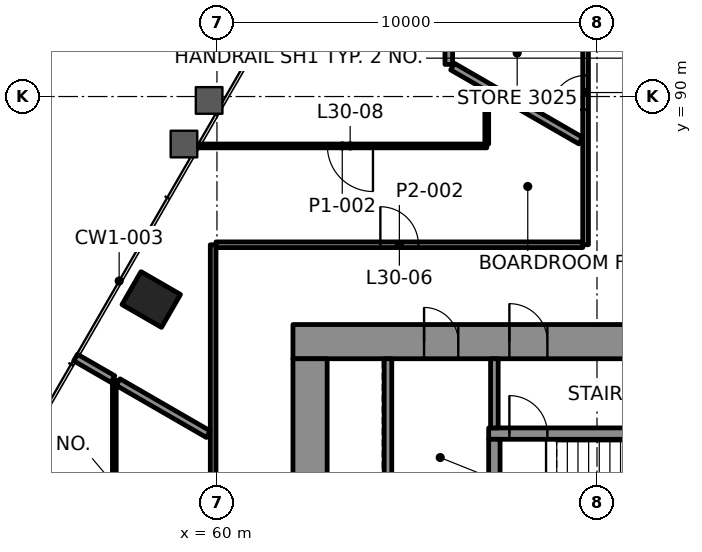
"""IFC4 building model, lengths in metres.
Left out: names, types, materials, properties, quantities, classifications, styles, units other than length and angle.
Written with IfcOpenShell. Run it as: python <this file> out.ifc"""

import sys

from ifc_helpers import new_model, si_unit, direction, frame, frame_2d, origin, origin_2d, place, context, subcontext, project, spatial, rectangle, extrude, element, fill, save


model = new_model("IFC4")
c1 = context("Model", 3, precision=1e-05, world=origin(), true_north=direction((0.0, 1.0)))
c2 = subcontext(c1, "Body", "Model", "MODEL_VIEW")
j1 = project(units=[si_unit("LENGTHUNIT", "METRE"), si_unit("PLANEANGLEUNIT", "RADIAN")], contexts=[c1])
p1 = place(None, origin())
s1 = spatial("IfcSite", under=j1, at=p1, CompositionType="ELEMENT")
p2 = place(p1, origin())
s2 = spatial("IfcBuilding", under=s1, at=p2, CompositionType="ELEMENT")
p3 = place(p2, frame((0.0, 0.0, 132.4)))
s3 = spatial("IfcBuildingStorey", under=s2, at=p3, CompositionType="ELEMENT", Elevation=132.4)
p4 = place(p3, frame((58.271, 84.658, -0.0), z_axis=(0.0, 0.0, 1.0), x_axis=(-0.5, -0.866025403784, 0.0)))
e1 = element("IfcColumn", 1, at=p4, inside=s3, PredefinedType="COLUMN", context=c2, shape_type="SweptSolid", body=[
    extrude(rectangle(XDim=1.0, YDim=1.2, at=origin_2d()), origin(), (0.0, 0.0, 1.0), 4.2),
])
p5 = place(p3, frame((62.0, 83.55, 0.0), z_axis=(0.0, 0.0, 1.0), x_axis=(1.0, 0.0, 0.0)))
e2 = element("IfcWall", 2, at=p5, inside=s3, PredefinedType="SHEAR", context=c2, shape_type="SweptSolid", body=[
    extrude(rectangle(XDim=25.1, YDim=0.9, at=frame_2d((12.55, 0.0))), origin(), (0.0, 0.0, 1.0), 4.0),
])
p6 = place(p5, frame((5.695, 0.0, 0.0)))
e3 = element("IfcOpeningElement", 3, at=p6, cuts=e2, PredefinedType="OPENING", context=c2, shape_type="SweptSolid", body=[
    extrude(rectangle(XDim=1.0, YDim=2.1, at=frame_2d((0.5, 1.05))), frame((0.0, 0.46, 0.0), z_axis=(0.0, -1.0, 0.0), x_axis=(1.0, 0.0, 0.0)), (0.0, 0.0, 1.0), 0.92),
])
p7 = place(p5, frame((19.505, 0.0, 0.0)))
e4 = element("IfcOpeningElement", 4, at=p7, cuts=e2, PredefinedType="OPENING", context=c2, shape_type="SweptSolid", body=[
    extrude(rectangle(XDim=1.0, YDim=2.1, at=frame_2d((0.5, 1.05))), frame((0.0, 0.46, 0.0), z_axis=(0.0, -1.0, 0.0), x_axis=(1.0, 0.0, 0.0)), (0.0, 0.0, 1.0), 0.92),
])
p8 = place(p5, frame((3.45, 0.0, 0.0)))
e5 = element("IfcOpeningElement", 5, at=p8, cuts=e2, PredefinedType="OPENING", context=c2, shape_type="SweptSolid", body=[
    extrude(rectangle(XDim=0.9, YDim=2.1, at=frame_2d((0.45, 1.05))), frame((0.0, 0.46, 0.0), z_axis=(0.0, -1.0, 0.0), x_axis=(1.0, 0.0, 0.0)), (0.0, 0.0, 1.0), 0.92),
])
p9 = place(p5, frame((12.65, 0.0, 0.0)))
e6 = element("IfcOpeningElement", 6, at=p9, cuts=e2, PredefinedType="OPENING", context=c2, shape_type="SweptSolid", body=[
    extrude(rectangle(XDim=0.9, YDim=2.1, at=frame_2d((0.45, 1.05))), frame((0.0, 0.46, 0.0), z_axis=(0.0, -1.0, 0.0), x_axis=(1.0, 0.0, 0.0)), (0.0, 0.0, 1.0), 0.92),
])
p10 = place(p5, frame((22.55, 0.0, 0.0)))
e7 = element("IfcOpeningElement", 7, at=p10, cuts=e2, PredefinedType="OPENING", context=c2, shape_type="SweptSolid", body=[
    extrude(rectangle(XDim=0.9, YDim=2.1, at=frame_2d((0.45, 1.05))), frame((0.0, 0.46, 0.0), z_axis=(0.0, -1.0, 0.0), x_axis=(1.0, 0.0, 0.0)), (0.0, 0.0, 1.0), 0.92),
])
p11 = place(p3, frame((62.45, 66.9, 0.0), z_axis=(0.0, 0.0, 1.0), x_axis=(0.0, 1.0, 0.0)))
e8 = element("IfcWall", 8, at=p11, inside=s3, PredefinedType="SHEAR", context=c2, shape_type="SweptSolid", body=[
    extrude(rectangle(XDim=16.2, YDim=0.9, at=frame_2d((8.1, 0.0))), origin(), (0.0, 0.0, 1.0), 4.0),
])
p12 = place(p11, frame((5.5, 0.0, 0.0)))
e9 = element("IfcOpeningElement", 9, at=p12, cuts=e8, PredefinedType="OPENING", context=c2, shape_type="SweptSolid", body=[
    extrude(rectangle(XDim=1.8, YDim=2.1, at=frame_2d((0.9, 1.05))), frame((0.0, 0.46, 0.0), z_axis=(0.0, -1.0, 0.0), x_axis=(1.0, 0.0, 0.0)), (0.0, 0.0, 1.0), 0.92),
])
p13 = place(p3, frame((67.15, 81.13, 0.0), z_axis=(0.0, 0.0, 1.0), x_axis=(1.0, 0.0, 0.0)))
e10 = element("IfcWall", 10, at=p13, inside=s3, PredefinedType="SHEAR", context=c2, shape_type="SweptSolid", body=[
    extrude(rectangle(XDim=6.91, YDim=0.3, at=frame_2d((3.455, 0.0))), origin(), (0.0, 0.0, 1.0), 4.0),
])
p14 = place(p13, frame((0.545, 0.0, 0.0)))
e11 = element("IfcOpeningElement", 11, at=p14, cuts=e10, PredefinedType="OPENING", context=c2, shape_type="SweptSolid", body=[
    extrude(rectangle(XDim=1.0, YDim=2.1, at=frame_2d((0.5, 1.05))), frame((0.0, 0.16, 0.0), z_axis=(0.0, -1.0, 0.0), x_axis=(1.0, 0.0, 0.0)), (0.0, 0.0, 1.0), 0.32),
])
p15 = place(p3, frame((67.3, 77.9, 0.0), z_axis=(0.0, 0.0, 1.0), x_axis=(0.0, 1.0, 0.0)))
e12 = element("IfcWall", 12, at=p15, inside=s3, PredefinedType="SHEAR", context=c2, shape_type="SweptSolid", body=[
    extrude(rectangle(XDim=3.08, YDim=0.3, at=frame_2d((1.54, 0.0))), origin(), (0.0, 0.0, 1.0), 4.0),
])
p16 = place(p3, frame((59.976, 86.1, 0.0), z_axis=(0.0, 0.0, 1.0), x_axis=(1.0, 0.0, 0.0)))
e13 = element("IfcWall", 13, at=p16, inside=s3, PredefinedType="PARTITIONING", context=c2, shape_type="SweptSolid", body=[
    extrude(rectangle(XDim=9.649, YDim=0.15, at=frame_2d((4.825, 0.0))), origin(), (0.0, 0.0, 1.0), 3.4),
])
p17 = place(p16, frame((4.325, 0.0, 0.0)))
e14 = element("IfcOpeningElement", 14, at=p17, cuts=e13, PredefinedType="OPENING", context=c2, shape_type="SweptSolid", body=[
    extrude(rectangle(XDim=1.0, YDim=2.1, at=frame_2d((0.5, 1.05))), frame((0.0, 0.085, 0.0), z_axis=(0.0, -1.0, 0.0), x_axis=(1.0, 0.0, 0.0)), (0.0, 0.0, 1.0), 0.17),
])
p18 = place(p3, frame((67.1, 88.7, 0.0), z_axis=(0.0, 0.0, 1.0), x_axis=(-1.0, 0.0, 0.0)))
e15 = element("IfcWall", 15, at=p18, inside=s3, PredefinedType="PARTITIONING", context=c2, shape_type="SweptSolid", body=[
    extrude(rectangle(XDim=7.604, YDim=0.1, at=frame_2d((3.802, 0.0))), origin(), (0.0, 0.0, 1.0), 3.165),
])
p19 = place(p18, frame((2.994, 0.0, 0.0)))
e16 = element("IfcOpeningElement", 16, at=p19, cuts=e15, PredefinedType="OPENING", context=c2, shape_type="SweptSolid", body=[
    extrude(rectangle(XDim=1.2, YDim=2.1, at=frame_2d((0.6, 1.05))), frame((0.0, 0.06, 0.0), z_axis=(0.0, -1.0, 0.0), x_axis=(1.0, 0.0, 0.0)), (0.0, 0.0, 1.0), 0.12),
])
p20 = place(p3, frame((69.7, 86.1, 0.0), z_axis=(0.0, 0.0, 1.0), x_axis=(0.0, 1.0, 0.0)))
e17 = element("IfcWall", 17, at=p20, inside=s3, PredefinedType="PARTITIONING", context=c2, shape_type="SweptSolid", body=[
    extrude(rectangle(XDim=10.6, YDim=0.15, at=frame_2d((5.3, 0.0))), origin(), (0.0, 0.0, 1.0), 3.322),
])
p21 = place(p20, frame((3.555, 0.0, 0.0)))
e18 = element("IfcOpeningElement", 18, at=p21, cuts=e17, PredefinedType="OPENING", context=c2, shape_type="SweptSolid", body=[
    extrude(rectangle(XDim=0.9, YDim=2.1, at=frame_2d((0.45, 1.05))), frame((0.0, 0.085, 0.0), z_axis=(0.0, -1.0, 0.0), x_axis=(1.0, 0.0, 0.0)), (0.0, 0.0, 1.0), 0.17),
])
p22 = place(p20, frame((6.232, 0.0, 0.0)))
e19 = element("IfcOpeningElement", 19, at=p22, cuts=e17, PredefinedType="OPENING", context=c2, shape_type="SweptSolid", body=[
    extrude(rectangle(XDim=0.9, YDim=2.1, at=frame_2d((0.45, 1.05))), frame((0.0, 0.085, 0.0), z_axis=(0.0, -1.0, 0.0), x_axis=(1.0, 0.0, 0.0)), (0.0, 0.0, 1.0), 0.17),
])
p23 = place(p20, frame((8.759, 0.0, 0.0)))
e20 = element("IfcOpeningElement", 20, at=p23, cuts=e17, PredefinedType="OPENING", context=c2, shape_type="SweptSolid", body=[
    extrude(rectangle(XDim=0.9, YDim=2.1, at=frame_2d((0.45, 1.05))), frame((0.0, 0.085, 0.0), z_axis=(0.0, -1.0, 0.0), x_axis=(1.0, 0.0, 0.0)), (0.0, 0.0, 1.0), 0.17),
])
p24 = place(p3, frame((67.1, 88.75, 0.0), z_axis=(0.0, 0.0, 1.0), x_axis=(0.0, 1.0, 0.0)))
e21 = element("IfcWall", 21, at=p24, inside=s3, PredefinedType="PARTITIONING", context=c2, shape_type="SweptSolid", body=[
    extrude(rectangle(XDim=1.372, YDim=0.1, at=frame_2d((0.686, 0.0))), origin(), (0.0, 0.0, 1.0), 3.322),
])
p25 = place(p3, frame((66.1, 90.846, 0.0), z_axis=(0.0, 0.0, 1.0), x_axis=(0.0, 1.0, 0.0)))
e22 = element("IfcWall", 22, at=p25, inside=s3, PredefinedType="PARTITIONING", context=c2, shape_type="SweptSolid", body=[
    extrude(rectangle(XDim=8.029, YDim=0.2, at=frame_2d((4.014, 0.0))), origin(), (0.0, 0.0, 1.0), 3.165),
])
p26 = place(p3, frame((59.9, 67.321, 0.0), z_axis=(0.0, 0.0, 1.0), x_axis=(0.0, 1.0, 0.0)))
e23 = element("IfcWall", 23, at=p26, inside=s3, PredefinedType="PARTITIONING", context=c2, shape_type="SweptSolid", body=[
    extrude(rectangle(XDim=18.778, YDim=0.15, at=frame_2d((9.389, 0.0))), origin(), (0.0, 0.0, 1.0), 3.4),
])
p27 = place(p3, frame((57.3, 82.542, 0.0), z_axis=(0.0, 0.0, 1.0), x_axis=(0.0, -1.0, 0.0)))
e24 = element("IfcWall", 24, at=p27, inside=s3, PredefinedType="PARTITIONING", context=c2, shape_type="SweptSolid", body=[
    extrude(rectangle(XDim=13.72, YDim=0.1, at=frame_2d((6.86, 0.0))), origin(), (0.0, 0.0, 1.0), 3.4),
])
p28 = place(p27, frame((6.36, 0.0, 0.0)))
e25 = element("IfcOpeningElement", 25, at=p28, cuts=e24, PredefinedType="OPENING", context=c2, shape_type="SweptSolid", body=[
    extrude(rectangle(XDim=1.0, YDim=2.1, at=frame_2d((0.5, 1.05))), frame((0.0, 0.06, 0.0), z_axis=(0.0, -1.0, 0.0), x_axis=(1.0, 0.0, 0.0)), (0.0, 0.0, 1.0), 0.12),
])
p29 = place(p3, frame((69.573, 88.84, 0.0), z_axis=(0.0, 0.0, 1.0), x_axis=(-0.866043624834, 0.499968438888, 0.0)))
e26 = element("IfcWall", 26, at=p29, inside=s3, PredefinedType="PARTITIONING", context=c2, shape_type="SweptSolid", body=[
    extrude(rectangle(XDim=3.895, YDim=0.2, at=frame_2d((1.947, 0.0))), origin(), (0.0, 0.0, 1.0), 3.322),
])
p30 = place(p3, frame((59.773, 81.115, 0.0), z_axis=(0.0, 0.0, 1.0), x_axis=(-0.86604168154, 0.499971805041, 0.0)))
e27 = element("IfcWall", 27, at=p30, inside=s3, PredefinedType="PARTITIONING", context=c2, shape_type="SweptSolid", body=[
    extrude(rectangle(XDim=2.74, YDim=0.2, at=frame_2d((1.37, 0.0))), origin(), (0.0, 0.0, 1.0), 3.4),
])
p31 = place(p3, frame((57.263, 82.564, 0.0), z_axis=(0.0, 0.0, 1.0), x_axis=(-0.8660349869, 0.499983401189, 0.0)))
e28 = element("IfcWall", 28, at=p31, inside=s3, PredefinedType="PARTITIONING", context=c2, shape_type="SweptSolid", body=[
    extrude(rectangle(XDim=1.134, YDim=0.2, at=frame_2d((0.567, 0.0))), origin(), (0.0, 0.0, 1.0), 3.165),
])
p32 = place(p3, frame((64.5, 77.9, 0.0), z_axis=(0.0, 0.0, 1.0), x_axis=(0.0, 1.0, 0.0)))
e29 = element("IfcWall", 29, at=p32, inside=s3, PredefinedType="PARTITIONING", context=c2, shape_type="SweptSolid", body=[
    extrude(rectangle(XDim=5.2, YDim=0.2, at=frame_2d((2.6, 0.0))), origin(), (0.0, 0.0, 1.0), 4.0),
])
p33 = place(p3, frame((67.3, 81.28, 0.0), z_axis=(0.0, 0.0, 1.0), x_axis=(0.0, 1.0, 0.0)))
e30 = element("IfcWall", 30, at=p33, inside=s3, PredefinedType="PARTITIONING", context=c2, shape_type="SweptSolid", body=[
    extrude(rectangle(XDim=1.82, YDim=0.2, at=frame_2d((0.91, 0.0))), origin(), (0.0, 0.0, 1.0), 4.0),
])
p34 = place(p17, origin())
e31 = element("IfcDoor", 31, at=p34, inside=s3, OperationType="SINGLE_SWING_RIGHT", PredefinedType="DOOR", context=c2, shape_type="SweptSolid", body=[
    extrude(rectangle(XDim=1.0, YDim=2.1, at=frame_2d((0.5, 1.05))), frame((0.0, 0.025, 0.0), z_axis=(0.0, -1.0, 0.0), x_axis=(1.0, 0.0, 0.0)), (0.0, 0.0, 1.0), 0.05),
])
fill(e14, e31)
p35 = place(p19, origin())
e32 = element("IfcDoor", 32, at=p35, inside=s3, OperationType="DOUBLE_DOOR_SINGLE_SWING", PredefinedType="DOOR", context=c2, shape_type="SweptSolid", body=[
    extrude(rectangle(XDim=1.2, YDim=2.1, at=frame_2d((0.6, 1.05))), frame((0.0, 0.025, 0.0), z_axis=(0.0, -1.0, 0.0), x_axis=(1.0, 0.0, 0.0)), (0.0, 0.0, 1.0), 0.05),
])
fill(e16, e32)
p36 = place(p21, origin())
e33 = element("IfcDoor", 33, at=p36, inside=s3, OperationType="SINGLE_SWING_RIGHT", PredefinedType="DOOR", context=c2, shape_type="SweptSolid", body=[
    extrude(rectangle(XDim=0.9, YDim=2.1, at=frame_2d((0.45, 1.05))), frame((0.0, 0.025, 0.0), z_axis=(0.0, -1.0, 0.0), x_axis=(1.0, 0.0, 0.0)), (0.0, 0.0, 1.0), 0.05),
])
fill(e18, e33)
p37 = place(p14, origin())
e34 = element("IfcDoor", 34, at=p37, inside=s3, OperationType="SINGLE_SWING_RIGHT", PredefinedType="DOOR", context=c2, shape_type="SweptSolid", body=[
    extrude(rectangle(XDim=1.0, YDim=2.1, at=frame_2d((0.5, 1.05))), frame((0.0, 0.025, 0.0), z_axis=(0.0, -1.0, 0.0), x_axis=(1.0, 0.0, 0.0)), (0.0, 0.0, 1.0), 0.05),
])
fill(e11, e34)
p38 = place(p6, origin())
e35 = element("IfcDoor", 35, at=p38, inside=s3, OperationType="SINGLE_SWING_LEFT", PredefinedType="DOOR", context=c2, shape_type="SweptSolid", body=[
    extrude(rectangle(XDim=1.0, YDim=2.1, at=frame_2d((0.5, 1.05))), frame((0.0, 0.17, 0.0), z_axis=(0.0, -1.0, 0.0), x_axis=(1.0, 0.0, 0.0)), (0.0, 0.0, 1.0), 0.34),
])
fill(e3, e35)
p39 = place(p8, origin())
e36 = element("IfcDoor", 36, at=p39, inside=s3, OperationType="SINGLE_SWING_RIGHT", PredefinedType="DOOR", context=c2, shape_type="SweptSolid", body=[
    extrude(rectangle(XDim=0.9, YDim=2.1, at=frame_2d((0.45, 1.05))), frame((0.0, 0.17, 0.0), z_axis=(0.0, -1.0, 0.0), x_axis=(1.0, 0.0, 0.0)), (0.0, 0.0, 1.0), 0.34),
])
fill(e5, e36)
save(model, sys.argv[1])
